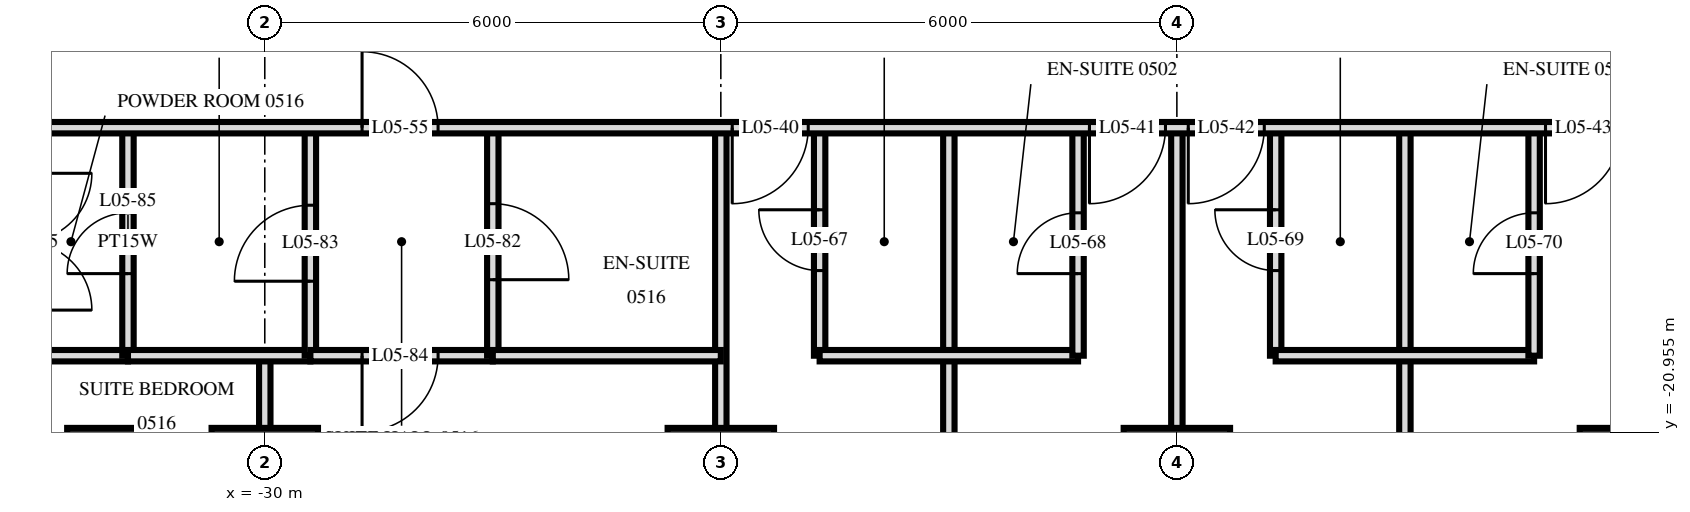
"""IFC4 building model, lengths in metres.
Left out: names, types, materials, properties, quantities, classifications, styles, units other than length and angle.
Written with IfcOpenShell. Run it as: python <this file> out.ifc"""

import sys

from ifc_helpers import new_model, si_unit, direction, frame, frame_2d, origin, origin_2d, place, context, subcontext, project, spatial, rectangle, extrude, element, fill, save


model = new_model("IFC4")
c1 = context("Model", 3, precision=1e-05, world=origin(), true_north=direction((0.0, 1.0)))
c2 = subcontext(c1, "Body", "Model", "MODEL_VIEW")
j1 = project(units=[si_unit("LENGTHUNIT", "METRE"), si_unit("PLANEANGLEUNIT", "RADIAN")], contexts=[c1])
p1 = place(None, origin())
s1 = spatial("IfcSite", under=j1, at=p1, CompositionType="ELEMENT")
p2 = place(p1, origin())
s2 = spatial("IfcBuilding", under=s1, at=p2, CompositionType="ELEMENT")
p3 = place(p2, frame((0.0, 0.0, 27.6)))
s3 = spatial("IfcBuildingStorey", under=s2, at=p3, CompositionType="ELEMENT", Elevation=27.6)
p4 = place(p3, frame((-32.1, -21.6, 0.0), z_axis=(0.0, 0.0, 1.0), x_axis=(0.0, 1.0, 0.0)))
e1 = element("IfcColumn", 1, at=p4, inside=s3, PredefinedType="COLUMN", context=c2, shape_type="SweptSolid", body=[
    extrude(rectangle(XDim=1.4, YDim=1.0, at=origin_2d()), origin(), (0.0, 0.0, 1.0), 3.6),
])
for number, where, z_axis, x_axis in (
    (2, (-30.0, -21.6, 0.0), (0.0, 0.0, 1.0), (1.0, 0.0, 0.0)),
    (3, (-24.0, -21.6, 0.0), (0.0, 0.0, 1.0), (1.0, 0.0, 0.0)),
    (4, (-18.0, -21.6, 0.0), (0.0, 0.0, 1.0), (1.0, 0.0, 0.0)),
    (5, (-12.0, -21.6, 0.0), (0.0, 0.0, 1.0), (1.0, 0.0, 0.0)),
):
    element("IfcColumn", number, at=place(p3, frame(where, z_axis=z_axis, x_axis=x_axis)), inside=s3, PredefinedType="COLUMN", context=c2, shape_type="SweptSolid", body=[
        extrude(rectangle(XDim=1.4, YDim=1.4, at=origin_2d()), origin(), (0.0, 0.0, 1.0), 3.6),
    ])
p5 = place(p3, frame((-13.3, -19.95, 0.0), z_axis=(0.0, 0.0, 1.0), x_axis=(0.0, 1.0, 0.0)))
e6 = element("IfcWall", 6, at=p5, inside=s3, PredefinedType="PARTITIONING", context=c2, shape_type="SweptSolid", body=[
    extrude(rectangle(XDim=3.0, YDim=0.15, at=frame_2d((1.5, 0.0))), origin(), (0.0, 0.0, 1.0), 3.32),
])
p6 = place(p5, frame((1.08, 0.0, 0.0)))
e7 = element("IfcOpeningElement", 7, at=p6, cuts=e6, PredefinedType="OPENING", context=c2, shape_type="SweptSolid", body=[
    extrude(rectangle(XDim=0.8, YDim=2.1, at=frame_2d((0.4, 1.05))), frame((0.0, 0.085, 0.0), z_axis=(0.0, -1.0, 0.0), x_axis=(1.0, 0.0, 0.0)), (0.0, 0.0, 1.0), 0.17),
])
p7 = place(p3, frame((-15.0, -29.22, 0.0), z_axis=(0.0, 0.0, 1.0), x_axis=(0.0, 1.0, 0.0)))
e8 = element("IfcWall", 8, at=p7, inside=s3, PredefinedType="PARTITIONING", context=c2, shape_type="SweptSolid", body=[
    extrude(rectangle(XDim=12.27, YDim=0.15, at=frame_2d((6.135, 0.0))), origin(), (0.0, 0.0, 1.0), 3.32),
])
p8 = place(p3, frame((-16.7, -19.95, 0.0), z_axis=(0.0, 0.0, 1.0), x_axis=(0.0, 1.0, 0.0)))
e9 = element("IfcWall", 9, at=p8, inside=s3, PredefinedType="PARTITIONING", context=c2, shape_type="SweptSolid", body=[
    extrude(rectangle(XDim=3.0, YDim=0.15, at=frame_2d((1.5, 0.0))), origin(), (0.0, 0.0, 1.0), 3.32),
])
p9 = place(p8, frame((1.12, 0.0, 0.0)))
e10 = element("IfcOpeningElement", 10, at=p9, cuts=e9, PredefinedType="OPENING", context=c2, shape_type="SweptSolid", body=[
    extrude(rectangle(XDim=0.8, YDim=2.1, at=frame_2d((0.4, 1.05))), frame((0.0, 0.085, 0.0), z_axis=(0.0, -1.0, 0.0), x_axis=(1.0, 0.0, 0.0)), (0.0, 0.0, 1.0), 0.17),
])
p10 = place(p3, frame((-18.0, -29.22, 0.0), z_axis=(0.0, 0.0, 1.0), x_axis=(0.0, 1.0, 0.0)))
e11 = element("IfcWall", 11, at=p10, inside=s3, PredefinedType="PARTITIONING", context=c2, shape_type="SweptSolid", body=[
    extrude(rectangle(XDim=12.27, YDim=0.15, at=frame_2d((6.135, 0.0))), origin(), (0.0, 0.0, 1.0), 3.32),
])
p11 = place(p3, frame((-19.3, -19.95, 0.0), z_axis=(0.0, 0.0, 1.0), x_axis=(0.0, 1.0, 0.0)))
e12 = element("IfcWall", 12, at=p11, inside=s3, PredefinedType="PARTITIONING", context=c2, shape_type="SweptSolid", body=[
    extrude(rectangle(XDim=3.0, YDim=0.15, at=frame_2d((1.5, 0.0))), origin(), (0.0, 0.0, 1.0), 3.32),
])
p12 = place(p11, frame((1.08, 0.0, 0.0)))
e13 = element("IfcOpeningElement", 13, at=p12, cuts=e12, PredefinedType="OPENING", context=c2, shape_type="SweptSolid", body=[
    extrude(rectangle(XDim=0.8, YDim=2.1, at=frame_2d((0.4, 1.05))), frame((0.0, 0.085, 0.0), z_axis=(0.0, -1.0, 0.0), x_axis=(1.0, 0.0, 0.0)), (0.0, 0.0, 1.0), 0.17),
])
p13 = place(p3, frame((-21.0, -29.22, 0.0), z_axis=(0.0, 0.0, 1.0), x_axis=(0.0, 1.0, 0.0)))
e14 = element("IfcWall", 14, at=p13, inside=s3, PredefinedType="PARTITIONING", context=c2, shape_type="SweptSolid", body=[
    extrude(rectangle(XDim=12.27, YDim=0.15, at=frame_2d((6.135, 0.0))), origin(), (0.0, 0.0, 1.0), 3.32),
])
p14 = place(p3, frame((-22.7, -19.95, 0.0), z_axis=(0.0, 0.0, 1.0), x_axis=(0.0, 1.0, 0.0)))
e15 = element("IfcWall", 15, at=p14, inside=s3, PredefinedType="PARTITIONING", context=c2, shape_type="SweptSolid", body=[
    extrude(rectangle(XDim=3.0, YDim=0.15, at=frame_2d((1.5, 0.0))), origin(), (0.0, 0.0, 1.0), 3.32),
])
p15 = place(p14, frame((1.12, 0.0, 0.0)))
e16 = element("IfcOpeningElement", 16, at=p15, cuts=e15, PredefinedType="OPENING", context=c2, shape_type="SweptSolid", body=[
    extrude(rectangle(XDim=0.8, YDim=2.1, at=frame_2d((0.4, 1.05))), frame((0.0, 0.085, 0.0), z_axis=(0.0, -1.0, 0.0), x_axis=(1.0, 0.0, 0.0)), (0.0, 0.0, 1.0), 0.17),
])
p16 = place(p3, frame((-24.0, -29.22, 0.0), z_axis=(0.0, 0.0, 1.0), x_axis=(0.0, 1.0, 0.0)))
e17 = element("IfcWall", 17, at=p16, inside=s3, PredefinedType="PARTITIONING", context=c2, shape_type="SweptSolid", body=[
    extrude(rectangle(XDim=12.27, YDim=0.15, at=frame_2d((6.135, 0.0))), origin(), (0.0, 0.0, 1.0), 3.32),
])
p17 = place(p3, frame((-27.0, -19.95, 0.0), z_axis=(0.0, 0.0, 1.0), x_axis=(0.0, 1.0, 0.0)))
e18 = element("IfcWall", 18, at=p17, inside=s3, PredefinedType="PARTITIONING", context=c2, shape_type="SweptSolid", body=[
    extrude(rectangle(XDim=3.0, YDim=0.15, at=frame_2d((1.5, 0.0))), origin(), (0.0, 0.0, 1.0), 3.32),
])
p18 = place(p17, frame((1.0, 0.0, 0.0)))
e19 = element("IfcOpeningElement", 19, at=p18, cuts=e18, PredefinedType="OPENING", context=c2, shape_type="SweptSolid", body=[
    extrude(rectangle(XDim=1.0, YDim=2.1, at=frame_2d((0.5, 1.05))), frame((0.0, 0.085, 0.0), z_axis=(0.0, -1.0, 0.0), x_axis=(1.0, 0.0, 0.0)), (0.0, 0.0, 1.0), 0.17),
])
p19 = place(p3, frame((-29.4, -19.95, 0.0), z_axis=(0.0, 0.0, 1.0), x_axis=(0.0, 1.0, 0.0)))
e20 = element("IfcWall", 20, at=p19, inside=s3, PredefinedType="PARTITIONING", context=c2, shape_type="SweptSolid", body=[
    extrude(rectangle(XDim=3.0, YDim=0.15, at=frame_2d((1.5, 0.0))), origin(), (0.0, 0.0, 1.0), 3.32),
])
p20 = place(p19, frame((0.98, 0.0, 0.0)))
e21 = element("IfcOpeningElement", 21, at=p20, cuts=e20, PredefinedType="OPENING", context=c2, shape_type="SweptSolid", body=[
    extrude(rectangle(XDim=1.0, YDim=2.1, at=frame_2d((0.5, 1.05))), frame((0.0, 0.085, 0.0), z_axis=(0.0, -1.0, 0.0), x_axis=(1.0, 0.0, 0.0)), (0.0, 0.0, 1.0), 0.17),
])
p21 = place(p3, frame((-30.0, -28.978, 0.0), z_axis=(0.0, 0.0, 1.0), x_axis=(0.0, 1.0, 0.0)))
e22 = element("IfcWall", 22, at=p21, inside=s3, PredefinedType="PARTITIONING", context=c2, shape_type="SweptSolid", body=[
    extrude(rectangle(XDim=9.028, YDim=0.15, at=frame_2d((4.514, 0.0))), origin(), (0.0, 0.0, 1.0), 3.32),
])
p22 = place(p21, frame((3.987, 0.0, 0.0)))
e23 = element("IfcOpeningElement", 23, at=p22, cuts=e22, PredefinedType="OPENING", context=c2, shape_type="SweptSolid", body=[
    extrude(rectangle(XDim=0.9, YDim=2.1, at=frame_2d((0.45, 1.05))), frame((0.0, 0.085, 0.0), z_axis=(0.0, -1.0, 0.0), x_axis=(1.0, 0.0, 0.0)), (0.0, 0.0, 1.0), 0.17),
])
p23 = place(p3, frame((-31.8, -19.95, 0.0), z_axis=(0.0, 0.0, 1.0), x_axis=(0.0, 1.0, 0.0)))
e24 = element("IfcWall", 24, at=p23, inside=s3, PredefinedType="PLUMBINGWALL", context=c2, shape_type="SweptSolid", body=[
    extrude(rectangle(XDim=3.0, YDim=0.15, at=frame_2d((1.5, 0.0))), origin(), (0.0, 0.0, 1.0), 3.32),
])
p24 = place(p23, frame((1.08, 0.0, 0.0)))
e25 = element("IfcOpeningElement", 25, at=p24, cuts=e24, PredefinedType="OPENING", context=c2, shape_type="SweptSolid", body=[
    extrude(rectangle(XDim=0.8, YDim=2.1, at=frame_2d((0.4, 1.05))), frame((0.0, 0.085, 0.0), z_axis=(0.0, -1.0, 0.0), x_axis=(1.0, 0.0, 0.0)), (0.0, 0.0, 1.0), 0.17),
])
p25 = place(p3, frame((-29.4, -19.95, 0.0), z_axis=(0.0, 0.0, 1.0), x_axis=(1.0, 0.0, 0.0)))
e26 = element("IfcWall", 26, at=p25, inside=s3, PredefinedType="PARTITIONING", context=c2, shape_type="SweptSolid", body=[
    extrude(rectangle(XDim=2.4, YDim=0.15, at=frame_2d((1.2, 0.0))), origin(), (0.0, 0.0, 1.0), 3.32),
])
p26 = place(p25, frame((0.68, 0.0, 0.0)))
e27 = element("IfcOpeningElement", 27, at=p26, cuts=e26, PredefinedType="OPENING", context=c2, shape_type="SweptSolid", body=[
    extrude(rectangle(XDim=1.0, YDim=2.1, at=frame_2d((0.5, 1.05))), frame((0.0, 0.085, 0.0), z_axis=(0.0, -1.0, 0.0), x_axis=(1.0, 0.0, 0.0)), (0.0, 0.0, 1.0), 0.17),
])
p27 = place(p3, frame((-31.8, -19.95, 0.0), z_axis=(0.0, 0.0, 1.0), x_axis=(1.0, 0.0, 0.0)))
e28 = element("IfcWall", 28, at=p27, inside=s3, PredefinedType="PARTITIONING", context=c2, shape_type="SweptSolid", body=[
    extrude(rectangle(XDim=2.4, YDim=0.15, at=frame_2d((1.2, 0.0))), origin(), (0.0, 0.0, 1.0), 3.32),
])
p28 = place(p3, frame((-27.0, -19.95, 0.0), z_axis=(0.0, 0.0, 1.0), x_axis=(1.0, 0.0, 0.0)))
e29 = element("IfcWall", 29, at=p28, inside=s3, PredefinedType="PARTITIONING", context=c2, shape_type="SweptSolid", body=[
    extrude(rectangle(XDim=3.0, YDim=0.15, at=frame_2d((1.5, 0.0))), origin(), (0.0, 0.0, 1.0), 3.32),
])
for number, where, z_axis, x_axis in (
    (30, (-22.7, -19.95, 0.0), (0.0, 0.0, 1.0), (1.0, 0.0, 0.0)),
    (31, (-16.7, -19.95, 0.0), (0.0, 0.0, 1.0), (1.0, 0.0, 0.0)),
):
    element("IfcWall", number, at=place(p3, frame(where, z_axis=z_axis, x_axis=x_axis)), inside=s3, PredefinedType="PARTITIONING", context=c2, shape_type="SweptSolid", body=[
        extrude(rectangle(XDim=3.4, YDim=0.15, at=frame_2d((1.7, 0.0))), origin(), (0.0, 0.0, 1.0), 3.32),
    ])
p29 = place(p3, frame((-33.12, -19.95, 0.0), z_axis=(0.0, 0.0, 1.0), x_axis=(1.0, 0.0, 0.0)))
e32 = element("IfcWall", 32, at=p29, inside=s3, PredefinedType="PLUMBINGWALL", context=c2, shape_type="SweptSolid", body=[
    extrude(rectangle(XDim=1.32, YDim=0.15, at=frame_2d((0.66, 0.0))), origin(), (0.0, 0.0, 1.0), 3.32),
])
p30 = place(p3, frame((-33.12, -16.95, 0.0), z_axis=(0.0, 0.0, 1.0), x_axis=(1.0, 0.0, 0.0)))
e33 = element("IfcWall", 33, at=p30, inside=s3, PredefinedType="PARTITIONING", context=c2, shape_type="SweptSolid", body=[
    extrude(rectangle(XDim=66.24, YDim=0.15, at=frame_2d((33.12, 0.0))), origin(), (0.0, 0.0, 1.0), 3.32),
])
p31 = place(p30, frame((9.27, 0.0, 0.0)))
e34 = element("IfcOpeningElement", 34, at=p31, cuts=e33, PredefinedType="OPENING", context=c2, shape_type="SweptSolid", body=[
    extrude(rectangle(XDim=1.0, YDim=2.1, at=frame_2d((0.5, 1.05))), frame((0.0, 0.085, 0.0), z_axis=(0.0, -1.0, 0.0), x_axis=(1.0, 0.0, 0.0)), (0.0, 0.0, 1.0), 0.17),
])
p32 = place(p30, frame((13.97, 0.0, 0.0)))
e35 = element("IfcOpeningElement", 35, at=p32, cuts=e33, PredefinedType="OPENING", context=c2, shape_type="SweptSolid", body=[
    extrude(rectangle(XDim=1.0, YDim=2.1, at=frame_2d((0.5, 1.05))), frame((0.0, 0.085, 0.0), z_axis=(0.0, -1.0, 0.0), x_axis=(1.0, 0.0, 0.0)), (0.0, 0.0, 1.0), 0.17),
])
p33 = place(p30, frame((15.27, 0.0, 0.0)))
e36 = element("IfcOpeningElement", 36, at=p33, cuts=e33, PredefinedType="OPENING", context=c2, shape_type="SweptSolid", body=[
    extrude(rectangle(XDim=1.0, YDim=2.1, at=frame_2d((0.5, 1.05))), frame((0.0, 0.085, 0.0), z_axis=(0.0, -1.0, 0.0), x_axis=(1.0, 0.0, 0.0)), (0.0, 0.0, 1.0), 0.17),
])
p34 = place(p30, frame((19.97, 0.0, 0.0)))
e37 = element("IfcOpeningElement", 37, at=p34, cuts=e33, PredefinedType="OPENING", context=c2, shape_type="SweptSolid", body=[
    extrude(rectangle(XDim=1.0, YDim=2.1, at=frame_2d((0.5, 1.05))), frame((0.0, 0.085, 0.0), z_axis=(0.0, -1.0, 0.0), x_axis=(1.0, 0.0, 0.0)), (0.0, 0.0, 1.0), 0.17),
])
p35 = place(p30, frame((22.27, 0.0, 0.0)))
e38 = element("IfcOpeningElement", 38, at=p35, cuts=e33, PredefinedType="OPENING", context=c2, shape_type="SweptSolid", body=[
    extrude(rectangle(XDim=1.0, YDim=2.1, at=frame_2d((0.5, 1.05))), frame((0.0, 0.085, 0.0), z_axis=(0.0, -1.0, 0.0), x_axis=(1.0, 0.0, 0.0)), (0.0, 0.0, 1.0), 0.17),
])
p36 = place(p30, frame((28.97, 0.0, 0.0)))
e39 = element("IfcOpeningElement", 39, at=p36, cuts=e33, PredefinedType="OPENING", context=c2, shape_type="SweptSolid", body=[
    extrude(rectangle(XDim=1.0, YDim=2.1, at=frame_2d((0.5, 1.05))), frame((0.0, 0.085, 0.0), z_axis=(0.0, -1.0, 0.0), x_axis=(1.0, 0.0, 0.0)), (0.0, 0.0, 1.0), 0.17),
])
p37 = place(p30, frame((30.27, 0.0, 0.0)))
e40 = element("IfcOpeningElement", 40, at=p37, cuts=e33, PredefinedType="OPENING", context=c2, shape_type="SweptSolid", body=[
    extrude(rectangle(XDim=1.0, YDim=2.1, at=frame_2d((0.5, 1.05))), frame((0.0, 0.085, 0.0), z_axis=(0.0, -1.0, 0.0), x_axis=(1.0, 0.0, 0.0)), (0.0, 0.0, 1.0), 0.17),
])
p38 = place(p30, frame((34.97, 0.0, 0.0)))
e41 = element("IfcOpeningElement", 41, at=p38, cuts=e33, PredefinedType="OPENING", context=c2, shape_type="SweptSolid", body=[
    extrude(rectangle(XDim=1.0, YDim=2.1, at=frame_2d((0.5, 1.05))), frame((0.0, 0.085, 0.0), z_axis=(0.0, -1.0, 0.0), x_axis=(1.0, 0.0, 0.0)), (0.0, 0.0, 1.0), 0.17),
])
p39 = place(p30, frame((36.27, 0.0, 0.0)))
e42 = element("IfcOpeningElement", 42, at=p39, cuts=e33, PredefinedType="OPENING", context=c2, shape_type="SweptSolid", body=[
    extrude(rectangle(XDim=1.0, YDim=2.1, at=frame_2d((0.5, 1.05))), frame((0.0, 0.085, 0.0), z_axis=(0.0, -1.0, 0.0), x_axis=(1.0, 0.0, 0.0)), (0.0, 0.0, 1.0), 0.17),
])
p40 = place(p30, frame((40.97, 0.0, 0.0)))
e43 = element("IfcOpeningElement", 43, at=p40, cuts=e33, PredefinedType="OPENING", context=c2, shape_type="SweptSolid", body=[
    extrude(rectangle(XDim=1.0, YDim=2.1, at=frame_2d((0.5, 1.05))), frame((0.0, 0.085, 0.0), z_axis=(0.0, -1.0, 0.0), x_axis=(1.0, 0.0, 0.0)), (0.0, 0.0, 1.0), 0.17),
])
p41 = place(p30, frame((42.27, 0.0, 0.0)))
e44 = element("IfcOpeningElement", 44, at=p41, cuts=e33, PredefinedType="OPENING", context=c2, shape_type="SweptSolid", body=[
    extrude(rectangle(XDim=1.0, YDim=2.1, at=frame_2d((0.5, 1.05))), frame((0.0, 0.085, 0.0), z_axis=(0.0, -1.0, 0.0), x_axis=(1.0, 0.0, 0.0)), (0.0, 0.0, 1.0), 0.17),
])
p42 = place(p30, frame((46.97, 0.0, 0.0)))
e45 = element("IfcOpeningElement", 45, at=p42, cuts=e33, PredefinedType="OPENING", context=c2, shape_type="SweptSolid", body=[
    extrude(rectangle(XDim=1.0, YDim=2.1, at=frame_2d((0.5, 1.05))), frame((0.0, 0.085, 0.0), z_axis=(0.0, -1.0, 0.0), x_axis=(1.0, 0.0, 0.0)), (0.0, 0.0, 1.0), 0.17),
])
p43 = place(p30, frame((48.27, 0.0, 0.0)))
e46 = element("IfcOpeningElement", 46, at=p43, cuts=e33, PredefinedType="OPENING", context=c2, shape_type="SweptSolid", body=[
    extrude(rectangle(XDim=1.0, YDim=2.1, at=frame_2d((0.5, 1.05))), frame((0.0, 0.085, 0.0), z_axis=(0.0, -1.0, 0.0), x_axis=(1.0, 0.0, 0.0)), (0.0, 0.0, 1.0), 0.17),
])
p44 = place(p30, frame((52.97, 0.0, 0.0)))
e47 = element("IfcOpeningElement", 47, at=p44, cuts=e33, PredefinedType="OPENING", context=c2, shape_type="SweptSolid", body=[
    extrude(rectangle(XDim=1.0, YDim=2.1, at=frame_2d((0.5, 1.05))), frame((0.0, 0.085, 0.0), z_axis=(0.0, -1.0, 0.0), x_axis=(1.0, 0.0, 0.0)), (0.0, 0.0, 1.0), 0.17),
])
p45 = place(p30, frame((54.27, 0.0, 0.0)))
e48 = element("IfcOpeningElement", 48, at=p45, cuts=e33, PredefinedType="OPENING", context=c2, shape_type="SweptSolid", body=[
    extrude(rectangle(XDim=1.0, YDim=2.1, at=frame_2d((0.5, 1.05))), frame((0.0, 0.085, 0.0), z_axis=(0.0, -1.0, 0.0), x_axis=(1.0, 0.0, 0.0)), (0.0, 0.0, 1.0), 0.17),
])
p46 = place(p30, frame((4.4, 0.0, 0.0)))
e49 = element("IfcOpeningElement", 49, at=p46, cuts=e33, PredefinedType="OPENING", context=c2, shape_type="SweptSolid", body=[
    extrude(rectangle(XDim=1.0, YDim=2.1, at=frame_2d((0.5, 1.05))), frame((0.0, 0.085, 0.0), z_axis=(0.0, -1.0, 0.0), x_axis=(1.0, 0.0, 0.0)), (0.0, 0.0, 1.0), 0.17),
])
p47 = place(p30, frame((60.8, 0.0, 0.0)))
e50 = element("IfcOpeningElement", 50, at=p47, cuts=e33, PredefinedType="OPENING", context=c2, shape_type="SweptSolid", body=[
    extrude(rectangle(XDim=1.0, YDim=2.1, at=frame_2d((0.5, 1.05))), frame((0.0, 0.085, 0.0), z_axis=(0.0, -1.0, 0.0), x_axis=(1.0, 0.0, 0.0)), (0.0, 0.0, 1.0), 0.17),
])
p48 = place(p31, frame((0.5, 0.0, 0.0), z_axis=(0.0, 0.0, 1.0), x_axis=(-1.0, 0.0, 0.0)))
e51 = element("IfcDoor", 51, at=p48, inside=s3, OperationType="SINGLE_SWING_LEFT", PredefinedType="DOOR", context=c2, shape_type="SweptSolid", body=[
    extrude(rectangle(XDim=1.0, YDim=2.1, at=frame_2d((0.0, 1.05))), frame((0.0, -0.025, 0.0), z_axis=(0.0, 1.0, 0.0), x_axis=(-1.0, 0.0, 0.0)), (0.0, 0.0, 1.0), 0.05),
])
fill(e34, e51)
p49 = place(p32, frame((0.5, 0.0, 0.0), z_axis=(0.0, 0.0, 1.0), x_axis=(-1.0, 0.0, 0.0)))
e52 = element("IfcDoor", 52, at=p49, inside=s3, OperationType="SINGLE_SWING_LEFT", PredefinedType="DOOR", context=c2, shape_type="SweptSolid", body=[
    extrude(rectangle(XDim=1.0, YDim=2.1, at=frame_2d((0.0, 1.05))), frame((0.0, -0.025, 0.0), z_axis=(0.0, 1.0, 0.0), x_axis=(-1.0, 0.0, 0.0)), (0.0, 0.0, 1.0), 0.05),
])
fill(e35, e52)
p50 = place(p33, frame((0.5, 0.0, 0.0), z_axis=(0.0, 0.0, 1.0), x_axis=(-1.0, 0.0, 0.0)))
e53 = element("IfcDoor", 53, at=p50, inside=s3, OperationType="SINGLE_SWING_LEFT", PredefinedType="DOOR", context=c2, shape_type="SweptSolid", body=[
    extrude(rectangle(XDim=1.0, YDim=2.1, at=frame_2d((0.0, 1.05))), frame((0.0, -0.025, 0.0), z_axis=(0.0, 1.0, 0.0), x_axis=(-1.0, 0.0, 0.0)), (0.0, 0.0, 1.0), 0.05),
])
fill(e36, e53)
p51 = place(p34, frame((0.5, 0.0, 0.0), z_axis=(0.0, 0.0, 1.0), x_axis=(-1.0, 0.0, 0.0)))
e54 = element("IfcDoor", 54, at=p51, inside=s3, OperationType="SINGLE_SWING_LEFT", PredefinedType="DOOR", context=c2, shape_type="SweptSolid", body=[
    extrude(rectangle(XDim=1.0, YDim=2.1, at=frame_2d((0.0, 1.05))), frame((0.0, -0.025, 0.0), z_axis=(0.0, 1.0, 0.0), x_axis=(-1.0, 0.0, 0.0)), (0.0, 0.0, 1.0), 0.05),
])
fill(e37, e54)
p52 = place(p46, origin())
e55 = element("IfcDoor", 55, at=p52, inside=s3, OperationType="SINGLE_SWING_RIGHT", PredefinedType="DOOR", context=c2, shape_type="SweptSolid", body=[
    extrude(rectangle(XDim=1.0, YDim=2.1, at=frame_2d((0.5, 1.05))), frame((0.0, 0.025, 0.0), z_axis=(0.0, -1.0, 0.0), x_axis=(1.0, 0.0, 0.0)), (0.0, 0.0, 1.0), 0.05),
])
fill(e49, e55)
p53 = place(p15, origin())
e56 = element("IfcDoor", 56, at=p53, inside=s3, OperationType="SINGLE_SWING_LEFT", PredefinedType="DOOR", context=c2, shape_type="SweptSolid", body=[
    extrude(rectangle(XDim=0.8, YDim=2.1, at=frame_2d((0.4, 1.05))), frame((0.0, 0.025, 0.0), z_axis=(0.0, -1.0, 0.0), x_axis=(1.0, 0.0, 0.0)), (0.0, 0.0, 1.0), 0.05),
])
fill(e16, e56)
p54 = place(p12, origin())
e57 = element("IfcDoor", 57, at=p54, inside=s3, OperationType="SINGLE_SWING_RIGHT", PredefinedType="DOOR", context=c2, shape_type="SweptSolid", body=[
    extrude(rectangle(XDim=0.8, YDim=2.1, at=frame_2d((0.4, 1.05))), frame((0.0, 0.025, 0.0), z_axis=(0.0, -1.0, 0.0), x_axis=(1.0, 0.0, 0.0)), (0.0, 0.0, 1.0), 0.05),
])
fill(e13, e57)
p55 = place(p9, origin())
e58 = element("IfcDoor", 58, at=p55, inside=s3, OperationType="SINGLE_SWING_LEFT", PredefinedType="DOOR", context=c2, shape_type="SweptSolid", body=[
    extrude(rectangle(XDim=0.8, YDim=2.1, at=frame_2d((0.4, 1.05))), frame((0.0, 0.025, 0.0), z_axis=(0.0, -1.0, 0.0), x_axis=(1.0, 0.0, 0.0)), (0.0, 0.0, 1.0), 0.05),
])
fill(e10, e58)
p56 = place(p6, origin())
e59 = element("IfcDoor", 59, at=p56, inside=s3, OperationType="SINGLE_SWING_RIGHT", PredefinedType="DOOR", context=c2, shape_type="SweptSolid", body=[
    extrude(rectangle(XDim=0.8, YDim=2.1, at=frame_2d((0.4, 1.05))), frame((0.0, 0.025, 0.0), z_axis=(0.0, -1.0, 0.0), x_axis=(1.0, 0.0, 0.0)), (0.0, 0.0, 1.0), 0.05),
])
fill(e7, e59)
p57 = place(p18, frame((0.5, 0.0, 0.0), z_axis=(0.0, 0.0, 1.0), x_axis=(-1.0, 0.0, 0.0)))
e60 = element("IfcDoor", 60, at=p57, inside=s3, OperationType="SINGLE_SWING_LEFT", PredefinedType="DOOR", context=c2, shape_type="SweptSolid", body=[
    extrude(rectangle(XDim=1.0, YDim=2.1, at=frame_2d((0.0, 1.05))), frame((0.0, -0.025, 0.0), z_axis=(0.0, 1.0, 0.0), x_axis=(-1.0, 0.0, 0.0)), (0.0, 0.0, 1.0), 0.05),
])
fill(e19, e60)
p58 = place(p20, origin())
e61 = element("IfcDoor", 61, at=p58, inside=s3, OperationType="SINGLE_SWING_RIGHT", PredefinedType="DOOR", context=c2, shape_type="SweptSolid", body=[
    extrude(rectangle(XDim=1.0, YDim=2.1, at=frame_2d((0.5, 1.05))), frame((0.0, 0.025, 0.0), z_axis=(0.0, -1.0, 0.0), x_axis=(1.0, 0.0, 0.0)), (0.0, 0.0, 1.0), 0.05),
])
fill(e21, e61)
p59 = place(p26, frame((0.5, 0.0, 0.0), z_axis=(0.0, 0.0, 1.0), x_axis=(-1.0, 0.0, 0.0)))
e62 = element("IfcDoor", 62, at=p59, inside=s3, OperationType="SINGLE_SWING_LEFT", PredefinedType="DOOR", context=c2, shape_type="SweptSolid", body=[
    extrude(rectangle(XDim=1.0, YDim=2.1, at=frame_2d((0.0, 1.05))), frame((0.0, -0.025, 0.0), z_axis=(0.0, 1.0, 0.0), x_axis=(-1.0, 0.0, 0.0)), (0.0, 0.0, 1.0), 0.05),
])
fill(e27, e62)
p60 = place(p24, origin())
e63 = element("IfcDoor", 63, at=p60, inside=s3, OperationType="SINGLE_SWING_RIGHT", PredefinedType="DOOR", context=c2, shape_type="SweptSolid", body=[
    extrude(rectangle(XDim=0.8, YDim=2.1, at=frame_2d((0.4, 1.05))), frame((0.0, 0.025, 0.0), z_axis=(0.0, -1.0, 0.0), x_axis=(1.0, 0.0, 0.0)), (0.0, 0.0, 1.0), 0.05),
])
fill(e25, e63)
save(model, sys.argv[1])
